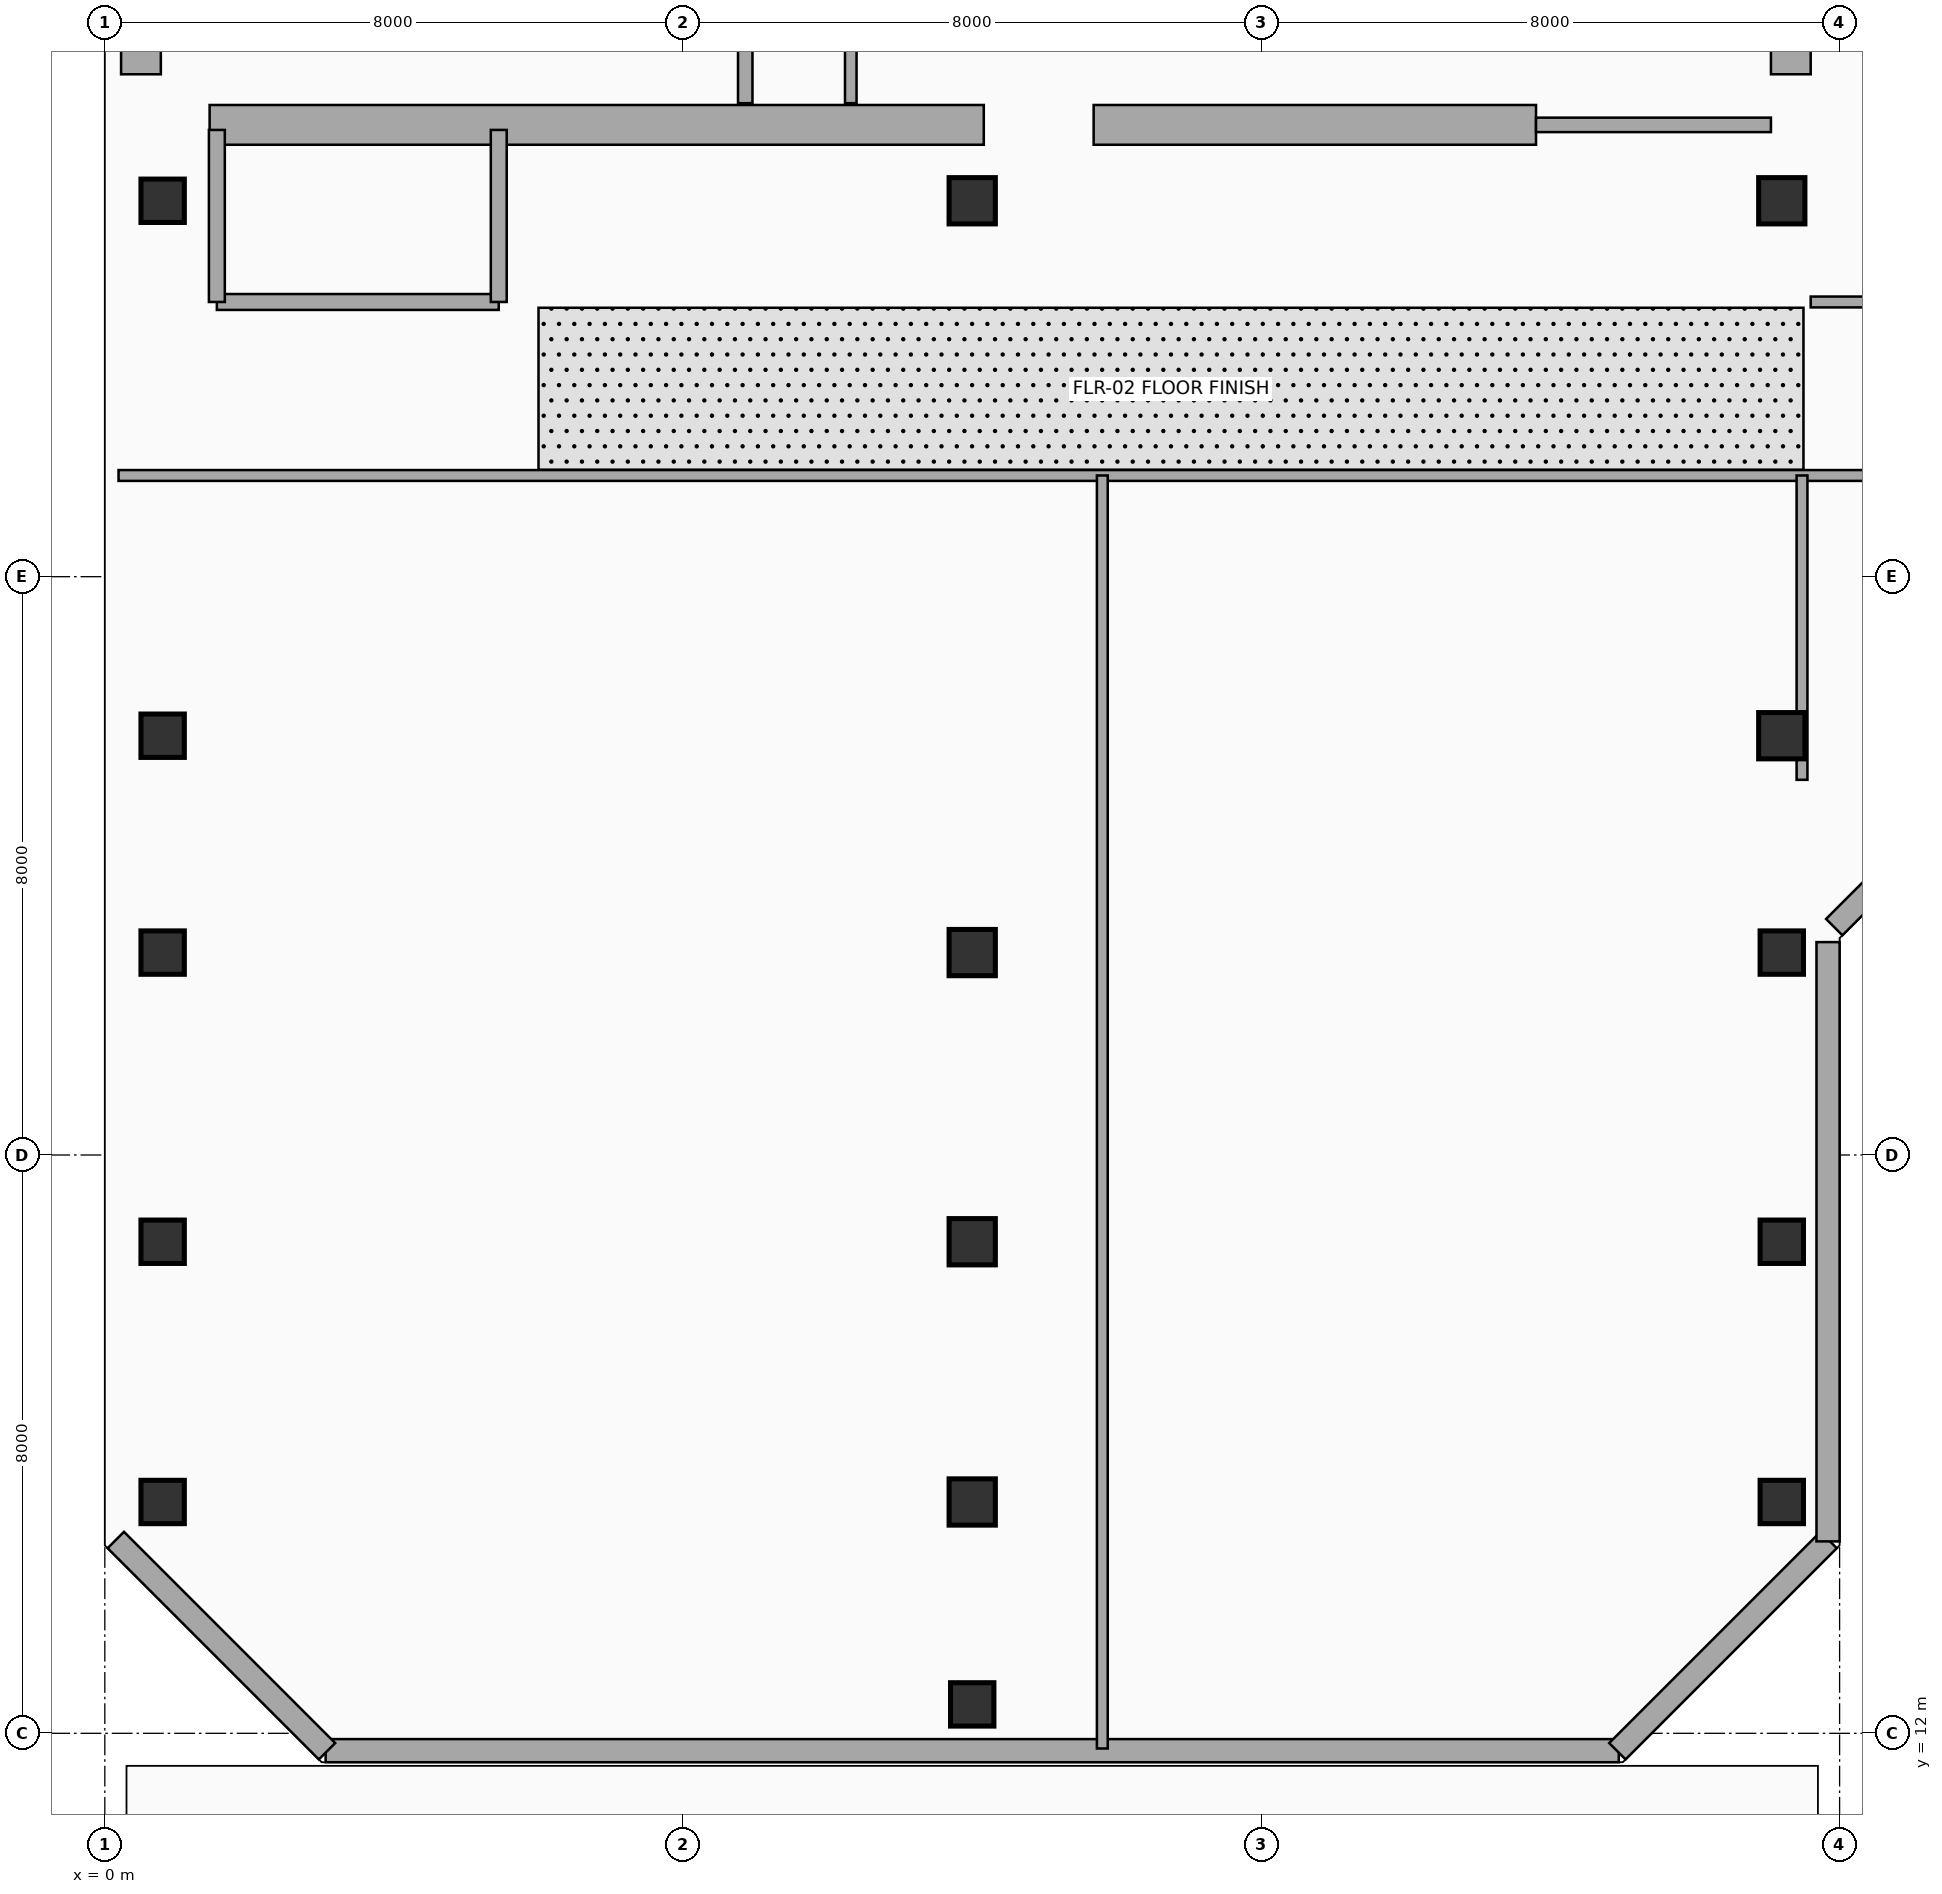
"""IFC4 building model, lengths in metres.
Left out: names, types, materials, properties, quantities, classifications, styles, units other than length and angle.
Written with IfcOpenShell. Run it as: python <this file> out.ifc"""

import sys

from ifc_helpers import new_model, si_unit, direction, frame, frame_2d, origin, origin_2d, place, context, subcontext, project, spatial, rectangle, extrude, element, fill, save


model = new_model("IFC4")
c1 = context("Model", 3, precision=1e-05, world=origin(), true_north=direction((0.0, 1.0)))
c2 = subcontext(c1, "Body", "Model", "MODEL_VIEW")
j1 = project(units=[si_unit("LENGTHUNIT", "METRE"), si_unit("PLANEANGLEUNIT", "RADIAN")], contexts=[c1])
p1 = place(None, origin())
s1 = spatial("IfcSite", under=j1, at=p1, CompositionType="ELEMENT")
p2 = place(p1, origin())
s2 = spatial("IfcBuilding", under=s1, at=p2, CompositionType="ELEMENT")
p3 = place(p2, frame((0.0, 0.0, 347.49)))
s3 = spatial("IfcBuildingStorey", under=s2, at=p3, CompositionType="ELEMENT", Elevation=347.49)
p4 = place(p3, frame((0.5, 34.95, 0.0), z_axis=(0.0, 0.0, 1.0), x_axis=(0.0, 1.0, 0.0)))
e1 = element("IfcWall", 1, at=p4, inside=s3, PredefinedType="SHEAR", context=c2, shape_type="SweptSolid", body=[
    extrude(rectangle(XDim=7.9, YDim=0.55, at=frame_2d((3.95, 0.0))), origin(), (0.0, 0.0, 1.0), 4.62),
])
p5 = place(p3, frame((23.325, 34.95, 0.0), z_axis=(0.0, 0.0, 1.0), x_axis=(0.0, 1.0, 0.0)))
e2 = element("IfcWall", 2, at=p5, inside=s3, PredefinedType="SHEAR", context=c2, shape_type="SweptSolid", body=[
    extrude(rectangle(XDim=10.64, YDim=0.55, at=frame_2d((5.32, 0.0))), origin(), (0.0, 0.0, 1.0), 4.62),
])
p6 = place(p3, frame((1.45, 34.25, 0.0), z_axis=(0.0, 0.0, 1.0), x_axis=(1.0, 0.0, 0.0)))
e3 = element("IfcWall", 3, at=p6, inside=s3, PredefinedType="SHEAR", context=c2, shape_type="SweptSolid", body=[
    extrude(rectangle(XDim=10.71, YDim=0.55, at=frame_2d((5.355, 0.0))), origin(), (0.0, 0.0, 1.0), 4.62),
])
p7 = place(p6, frame((7.25, 0.0, 0.0), z_axis=(0.0, 0.0, 1.0), x_axis=(-1.0, 0.0, 0.0)))
e4 = element("IfcOpeningElement", 4, at=p7, cuts=e3, PredefinedType="OPENING", context=c2, shape_type="SweptSolid", body=[
    extrude(rectangle(XDim=1.1, YDim=2.15, at=frame_2d((0.55, 1.075))), frame((0.0, 0.285, 0.0), z_axis=(0.0, -1.0, 0.0), x_axis=(1.0, 0.0, 0.0)), (0.0, 0.0, 1.0), 0.57),
])
p8 = place(p3, frame((13.68, 34.25, 0.0), z_axis=(0.0, 0.0, 1.0), x_axis=(1.0, 0.0, 0.0)))
e5 = element("IfcWall", 5, at=p8, inside=s3, PredefinedType="SHEAR", context=c2, shape_type="SweptSolid", body=[
    extrude(rectangle(XDim=6.12, YDim=0.55, at=frame_2d((3.06, 0.0))), origin(), (0.0, 0.0, 1.0), 4.62),
])
for number, where, z_axis, x_axis in (
    (6, (0.8, 15.2, 0.0), (0.0, 0.0, 1.0), (1.0, 0.0, 0.0)),
    (7, (0.8, 18.8, 0.0), (0.0, 0.0, 1.0), (1.0, 0.0, 0.0)),
    (8, (0.8, 22.8, 0.0), (0.0, 0.0, 1.0), (1.0, 0.0, 0.0)),
    (9, (0.8, 25.8, 0.0), (0.0, 0.0, 1.0), (1.0, 0.0, 0.0)),
    (10, (0.8, 33.2, 0.0), (0.0, 0.0, 1.0), (1.0, 0.0, 0.0)),
    (11, (12.0, 12.4, 0.0), (0.0, 0.0, 1.0), (1.0, 0.0, 0.0)),
):
    element("IfcColumn", number, at=place(p3, frame(where, z_axis=z_axis, x_axis=x_axis)), inside=s3, PredefinedType="COLUMN", context=c2, shape_type="SweptSolid", body=[
        extrude(rectangle(XDim=0.6, YDim=0.6, at=origin_2d()), origin(), (0.0, 0.0, 1.0), 4.62),
    ])
for number, where, z_axis, x_axis in (
    (12, (12.0, 15.2, 0.0), (0.0, 0.0, 1.0), (1.0, 0.0, 0.0)),
    (13, (12.0, 18.8, 0.0), (0.0, 0.0, 1.0), (1.0, 0.0, 0.0)),
    (14, (12.0, 22.8, 0.0), (0.0, 0.0, 1.0), (1.0, 0.0, 0.0)),
    (15, (12.0, 33.2, 0.0), (0.0, 0.0, 1.0), (1.0, 0.0, 0.0)),
):
    element("IfcColumn", number, at=place(p3, frame(where, z_axis=z_axis, x_axis=x_axis)), inside=s3, PredefinedType="COLUMN", context=c2, shape_type="SweptSolid", body=[
        extrude(rectangle(XDim=0.64, YDim=0.64, at=origin_2d()), origin(), (0.0, 0.0, 1.0), 4.62),
    ])
for number, where, z_axis, x_axis in (
    (16, (23.2, 15.2, 0.0), (0.0, 0.0, 1.0), (1.0, 0.0, 0.0)),
    (17, (23.2, 18.8, 0.0), (0.0, 0.0, 1.0), (1.0, 0.0, 0.0)),
    (18, (23.2, 22.8, 0.0), (0.0, 0.0, 1.0), (1.0, 0.0, 0.0)),
):
    element("IfcColumn", number, at=place(p3, frame(where, z_axis=z_axis, x_axis=x_axis)), inside=s3, PredefinedType="COLUMN", context=c2, shape_type="SweptSolid", body=[
        extrude(rectangle(XDim=0.6, YDim=0.6, at=origin_2d()), origin(), (0.0, 0.0, 1.0), 4.62),
    ])
for number, where, z_axis, x_axis in (
    (19, (23.2, 25.8, 0.0), (0.0, 0.0, 1.0), (1.0, 0.0, 0.0)),
    (20, (23.2, 33.2, 0.0), (0.0, 0.0, 1.0), (1.0, 0.0, 0.0)),
):
    element("IfcColumn", number, at=place(p3, frame(where, z_axis=z_axis, x_axis=x_axis)), inside=s3, PredefinedType="COLUMN", context=c2, shape_type="SweptSolid", body=[
        extrude(rectangle(XDim=0.64, YDim=0.64, at=origin_2d()), origin(), (0.0, 0.0, 1.0), 4.62),
    ])
p9 = place(p3, frame((3.055, 11.76, 0.0), z_axis=(0.0, 0.0, 1.0), x_axis=(1.0, 0.0, 0.0)))
e21 = element("IfcWall", 21, at=p9, inside=s3, PredefinedType="SOLIDWALL", context=c2, shape_type="SweptSolid", body=[
    extrude(rectangle(XDim=17.89, YDim=0.32, at=frame_2d((8.945, 0.0))), origin(), (0.0, 0.0, 1.0), 4.37),
])
p10 = place(p9, frame((6.009, 0.0, 0.0), z_axis=(0.0, 0.0, 1.0), x_axis=(-1.0, 0.0, 0.0)))
e22 = element("IfcOpeningElement", 22, at=p10, cuts=e21, PredefinedType="OPENING", context=c2, shape_type="SweptSolid", body=[
    extrude(rectangle(XDim=1.6, YDim=2.25, at=frame_2d((0.8, 1.125))), frame((0.0, 0.17, 0.0), z_axis=(0.0, -1.0, 0.0), x_axis=(1.0, 0.0, 0.0)), (0.0, 0.0, 1.0), 0.34),
])
p11 = place(p3, frame((20.926, 11.752, 0.0), z_axis=(0.0, 0.0, 1.0), x_axis=(0.707077242712, 0.707136318428, 0.0)))
e23 = element("IfcWall", 23, at=p11, inside=s3, PredefinedType="SOLIDWALL", context=c2, shape_type="SweptSolid", body=[
    extrude(rectangle(XDim=4.133, YDim=0.32, at=frame_2d((2.066, 0.0))), origin(), (0.0, 0.0, 1.0), 4.37),
])
p12 = place(p3, frame((23.84, 14.655, 0.0), z_axis=(0.0, 0.0, 1.0), x_axis=(0.0, 1.0, 0.0)))
e24 = element("IfcWall", 24, at=p12, inside=s3, PredefinedType="SOLIDWALL", context=c2, shape_type="SweptSolid", body=[
    extrude(rectangle(XDim=8.29, YDim=0.32, at=frame_2d((4.145, 0.0))), origin(), (0.0, 0.0, 1.0), 4.37),
])
p13 = place(p3, frame((23.926, 23.152, 0.0), z_axis=(0.0, 0.0, 1.0), x_axis=(0.707106781187, 0.707106781187, 0.0)))
e25 = element("IfcWall", 25, at=p13, inside=s3, PredefinedType="SOLIDWALL", context=c2, shape_type="SweptSolid", body=[
    extrude(rectangle(XDim=2.718, YDim=0.32, at=frame_2d((1.359, 0.0))), origin(), (0.0, 0.0, 1.0), 4.37),
])
p14 = place(p3, frame((0.152, 14.674, 0.0), z_axis=(0.0, 0.0, 1.0), x_axis=(0.707077242712, -0.707136318428, 0.0)))
e26 = element("IfcWall", 26, at=p14, inside=s3, PredefinedType="SOLIDWALL", context=c2, shape_type="SweptSolid", body=[
    extrude(rectangle(XDim=4.133, YDim=0.32, at=frame_2d((2.066, 0.0))), origin(), (0.0, 0.0, 1.0), 4.37),
])
p15 = place(p3, frame((8.86, 34.55, 0.0), z_axis=(0.0, 0.0, 1.0), x_axis=(0.0, 1.0, 0.0)))
e27 = element("IfcWall", 27, at=p15, inside=s3, PredefinedType="PARTITIONING", context=c2, shape_type="SweptSolid", body=[
    extrude(rectangle(XDim=2.5, YDim=0.2, at=frame_2d((1.25, 0.0))), origin(), (0.0, 0.0, 1.0), 4.37),
])
p16 = place(p3, frame((19.8, 34.25, 0.0), z_axis=(0.0, 0.0, 1.0), x_axis=(1.0, 0.0, 0.0)))
e28 = element("IfcWall", 28, at=p16, inside=s3, PredefinedType="PARTITIONING", context=c2, shape_type="SweptSolid", body=[
    extrude(rectangle(XDim=3.25, YDim=0.2, at=frame_2d((1.625, 0.0))), origin(), (0.0, 0.0, 1.0), 4.37),
])
p17 = place(p16, frame((2.15, 0.0, 0.0), z_axis=(0.0, 0.0, 1.0), x_axis=(-1.0, 0.0, 0.0)))
e29 = element("IfcOpeningElement", 29, at=p17, cuts=e28, PredefinedType="OPENING", context=c2, shape_type="SweptSolid", body=[
    extrude(rectangle(XDim=1.1, YDim=2.15, at=frame_2d((0.55, 1.075))), frame((0.0, 0.11, 0.0), z_axis=(0.0, -1.0, 0.0), x_axis=(1.0, 0.0, 0.0)), (0.0, 0.0, 1.0), 0.22),
])
p18 = place(p3, frame((1.55, 31.8, 0.0), z_axis=(0.0, 0.0, 1.0), x_axis=(1.0, 0.0, 0.0)))
e30 = element("IfcWall", 30, at=p18, inside=s3, PredefinedType="PARTITIONING", context=c2, shape_type="SweptSolid", body=[
    extrude(rectangle(XDim=3.9, YDim=0.22, at=frame_2d((1.95, 0.0))), origin(), (0.0, 0.0, 1.0), 4.37),
])
p19 = place(p18, frame((1.52, 0.0, 0.0), z_axis=(0.0, 0.0, 1.0), x_axis=(-1.0, 0.0, 0.0)))
e31 = element("IfcOpeningElement", 31, at=p19, cuts=e30, PredefinedType="OPENING", context=c2, shape_type="SweptSolid", body=[
    extrude(rectangle(XDim=1.1, YDim=2.2, at=frame_2d((0.55, 1.1))), frame((0.0, 0.12, 0.0), z_axis=(0.0, -1.0, 0.0), x_axis=(1.0, 0.0, 0.0)), (0.0, 0.0, 1.0), 0.24),
])
p20 = place(p18, frame((3.42, 0.0, 0.0), z_axis=(0.0, 0.0, 1.0), x_axis=(-1.0, 0.0, 0.0)))
e32 = element("IfcOpeningElement", 32, at=p20, cuts=e30, PredefinedType="OPENING", context=c2, shape_type="SweptSolid", body=[
    extrude(rectangle(XDim=1.1, YDim=2.2, at=frame_2d((0.55, 1.1))), frame((0.0, 0.12, 0.0), z_axis=(0.0, -1.0, 0.0), x_axis=(1.0, 0.0, 0.0)), (0.0, 0.0, 1.0), 0.24),
])
for number, where, z_axis, x_axis in (
    (33, (1.55, 31.8, 0.0), (0.0, 0.0, 1.0), (0.0, 1.0, 0.0)),
    (34, (5.45, 31.8, 0.0), (0.0, 0.0, 1.0), (0.0, 1.0, 0.0)),
):
    element("IfcWall", number, at=place(p3, frame(where, z_axis=z_axis, x_axis=x_axis)), inside=s3, PredefinedType="PARTITIONING", context=c2, shape_type="SweptSolid", body=[
        extrude(rectangle(XDim=2.38, YDim=0.22, at=frame_2d((1.19, 0.0))), origin(), (0.0, 0.0, 1.0), 4.37),
    ])
p21 = place(p3, frame((10.32, 34.55, 0.0), z_axis=(0.0, 0.0, 1.0), x_axis=(0.0, 1.0, 0.0)))
e35 = element("IfcWall", 35, at=p21, inside=s3, PredefinedType="PARTITIONING", context=c2, shape_type="SweptSolid", body=[
    extrude(rectangle(XDim=2.15, YDim=0.16, at=frame_2d((1.075, 0.0))), origin(), (0.0, 0.0, 1.0), 4.37),
])
p22 = place(p3, frame((0.19, 29.4, 0.0), z_axis=(0.0, 0.0, 1.0), x_axis=(1.0, 0.0, 0.0)))
e36 = element("IfcWall", 36, at=p22, inside=s3, PredefinedType="PARTITIONING", context=c2, shape_type="SweptSolid", body=[
    extrude(rectangle(XDim=44.02, YDim=0.15, at=frame_2d((22.01, 0.0))), origin(), (0.0, 0.0, 1.0), 4.055),
])
p23 = place(p22, frame((4.0, 0.0, 0.0)))
e37 = element("IfcOpeningElement", 37, at=p23, cuts=e36, PredefinedType="OPENING", context=c2, shape_type="SweptSolid", body=[
    extrude(rectangle(XDim=1.8, YDim=2.3, at=frame_2d((0.9, 1.15))), frame((0.0, 0.085, 0.0), z_axis=(0.0, -1.0, 0.0), x_axis=(1.0, 0.0, 0.0)), (0.0, 0.0, 1.0), 0.17),
])
p24 = place(p22, frame((15.0, 0.0, 0.0)))
e38 = element("IfcOpeningElement", 38, at=p24, cuts=e36, PredefinedType="OPENING", context=c2, shape_type="SweptSolid", body=[
    extrude(rectangle(XDim=1.8, YDim=2.3, at=frame_2d((0.9, 1.15))), frame((0.0, 0.085, 0.0), z_axis=(0.0, -1.0, 0.0), x_axis=(1.0, 0.0, 0.0)), (0.0, 0.0, 1.0), 0.17),
])
p25 = place(p22, frame((27.0, 0.0, 0.0)))
e39 = element("IfcOpeningElement", 39, at=p25, cuts=e36, PredefinedType="OPENING", context=c2, shape_type="SweptSolid", body=[
    extrude(rectangle(XDim=1.05, YDim=2.15, at=frame_2d((0.525, 1.075))), frame((0.0, 0.085, 0.0), z_axis=(0.0, -1.0, 0.0), x_axis=(1.0, 0.0, 0.0)), (0.0, 0.0, 1.0), 0.17),
])
p26 = place(p3, frame((23.6, 31.8, 0.0), z_axis=(0.0, 0.0, 1.0), x_axis=(1.0, 0.0, 0.0)))
e40 = element("IfcWall", 40, at=p26, inside=s3, PredefinedType="PARTITIONING", context=c2, shape_type="SweptSolid", body=[
    extrude(rectangle(XDim=20.61, YDim=0.15, at=frame_2d((10.305, 0.0))), origin(), (0.0, 0.0, 1.0), 4.37),
])
p27 = place(p26, frame((3.0, 0.0, 0.0)))
e41 = element("IfcOpeningElement", 41, at=p27, cuts=e40, PredefinedType="OPENING", context=c2, shape_type="SweptSolid", body=[
    extrude(rectangle(XDim=1.05, YDim=2.15, at=frame_2d((0.525, 1.075))), frame((0.0, 0.085, 0.0), z_axis=(0.0, -1.0, 0.0), x_axis=(1.0, 0.0, 0.0)), (0.0, 0.0, 1.0), 0.17),
])
p28 = place(p26, frame((12.0, 0.0, 0.0)))
e42 = element("IfcOpeningElement", 42, at=p28, cuts=e40, PredefinedType="OPENING", context=c2, shape_type="SweptSolid", body=[
    extrude(rectangle(XDim=0.95, YDim=2.15, at=frame_2d((0.475, 1.075))), frame((0.0, 0.085, 0.0), z_axis=(0.0, -1.0, 0.0), x_axis=(1.0, 0.0, 0.0)), (0.0, 0.0, 1.0), 0.17),
])
p29 = place(p3, frame((13.8, 11.79, 0.0), z_axis=(0.0, 0.0, 1.0), x_axis=(0.0, 1.0, 0.0)))
e43 = element("IfcWall", 43, at=p29, inside=s3, PredefinedType="PARTITIONING", context=c2, shape_type="SweptSolid", body=[
    extrude(rectangle(XDim=17.61, YDim=0.15, at=frame_2d((8.805, 0.0))), origin(), (0.0, 0.0, 1.0), 4.37),
])
p30 = place(p3, frame((23.48, 25.19, 0.0), z_axis=(0.0, 0.0, 1.0), x_axis=(0.0, 1.0, 0.0)))
e44 = element("IfcWall", 44, at=p30, inside=s3, PredefinedType="PARTITIONING", context=c2, shape_type="SweptSolid", body=[
    extrude(rectangle(XDim=4.21, YDim=0.15, at=frame_2d((2.105, 0.0))), origin(), (0.0, 0.0, 1.0), 3.855),
])
p31 = place(p10, origin())
e45 = element("IfcDoor", 45, at=p31, inside=s3, OperationType="DOUBLE_DOOR_SINGLE_SWING", PredefinedType="DOOR", context=c2, shape_type="SweptSolid", body=[
    extrude(rectangle(XDim=1.6, YDim=2.25, at=frame_2d((0.8, 1.125))), frame((0.0, 0.025, 0.0), z_axis=(0.0, -1.0, 0.0), x_axis=(1.0, 0.0, 0.0)), (0.0, 0.0, 1.0), 0.05),
])
fill(e22, e45)
p32 = place(p7, origin())
e46 = element("IfcDoor", 46, at=p32, inside=s3, OperationType="SINGLE_SWING_RIGHT", PredefinedType="DOOR", context=c2, shape_type="SweptSolid", body=[
    extrude(rectangle(XDim=1.1, YDim=2.15, at=frame_2d((0.55, 1.075))), frame((0.0, 0.025, 0.0), z_axis=(0.0, -1.0, 0.0), x_axis=(1.0, 0.0, 0.0)), (0.0, 0.0, 1.0), 0.05),
])
fill(e4, e46)
p33 = place(p17, origin())
e47 = element("IfcDoor", 47, at=p33, inside=s3, OperationType="SINGLE_SWING_RIGHT", PredefinedType="DOOR", context=c2, shape_type="SweptSolid", body=[
    extrude(rectangle(XDim=1.1, YDim=2.15, at=frame_2d((0.55, 1.075))), frame((0.0, 0.025, 0.0), z_axis=(0.0, -1.0, 0.0), x_axis=(1.0, 0.0, 0.0)), (0.0, 0.0, 1.0), 0.05),
])
fill(e29, e47)
p34 = place(p19, origin())
e48 = element("IfcDoor", 48, at=p34, inside=s3, OperationType="SLIDING_TO_LEFT", PredefinedType="DOOR", context=c2, shape_type="SweptSolid", body=[
    extrude(rectangle(XDim=1.1, YDim=2.2, at=frame_2d((0.55, 1.1))), frame((0.0, 0.025, 0.0), z_axis=(0.0, -1.0, 0.0), x_axis=(1.0, 0.0, 0.0)), (0.0, 0.0, 1.0), 0.05),
])
fill(e31, e48)
p35 = place(p20, origin())
e49 = element("IfcDoor", 49, at=p35, inside=s3, OperationType="SLIDING_TO_LEFT", PredefinedType="DOOR", context=c2, shape_type="SweptSolid", body=[
    extrude(rectangle(XDim=1.1, YDim=2.2, at=frame_2d((0.55, 1.1))), frame((0.0, 0.025, 0.0), z_axis=(0.0, -1.0, 0.0), x_axis=(1.0, 0.0, 0.0)), (0.0, 0.0, 1.0), 0.05),
])
fill(e32, e49)
p36 = place(p23, origin())
e50 = element("IfcDoor", 50, at=p36, inside=s3, OperationType="SINGLE_SWING_LEFT", PredefinedType="DOOR", context=c2, shape_type="SweptSolid", body=[
    extrude(rectangle(XDim=1.8, YDim=2.3, at=frame_2d((0.9, 1.15))), frame((0.0, 0.025, 0.0), z_axis=(0.0, -1.0, 0.0), x_axis=(1.0, 0.0, 0.0)), (0.0, 0.0, 1.0), 0.05),
])
fill(e37, e50)
p37 = place(p24, origin())
e51 = element("IfcDoor", 51, at=p37, inside=s3, OperationType="SINGLE_SWING_RIGHT", PredefinedType="DOOR", context=c2, shape_type="SweptSolid", body=[
    extrude(rectangle(XDim=1.8, YDim=2.3, at=frame_2d((0.9, 1.15))), frame((0.0, 0.025, 0.0), z_axis=(0.0, -1.0, 0.0), x_axis=(1.0, 0.0, 0.0)), (0.0, 0.0, 1.0), 0.05),
])
fill(e38, e51)
save(model, sys.argv[1])
